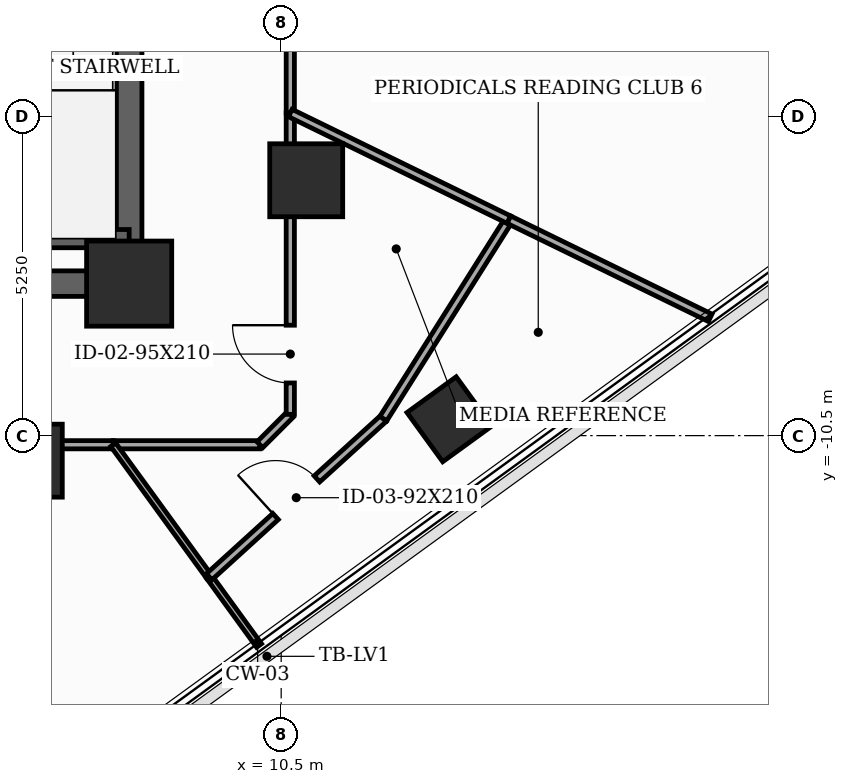
"""IFC4 building model, lengths in metres.
Left out: names, types, materials, properties, quantities, classifications, styles, units other than length and angle.
Written with IfcOpenShell. Run it as: python <this file> out.ifc"""

import sys

from ifc_helpers import new_model, si_unit, direction, frame, frame_2d, origin, origin_2d, place, context, subcontext, project, spatial, rectangle, extrude, element, fill, save


model = new_model("IFC4")
c1 = context("Model", 3, precision=1e-05, world=origin(), true_north=direction((0.0, 1.0)))
c2 = subcontext(c1, "Body", "Model", "MODEL_VIEW")
j1 = project(units=[si_unit("LENGTHUNIT", "METRE"), si_unit("PLANEANGLEUNIT", "RADIAN")], contexts=[c1])
p1 = place(None, origin())
s1 = spatial("IfcSite", under=j1, at=p1, CompositionType="ELEMENT")
p2 = place(p1, origin())
s2 = spatial("IfcBuilding", under=s1, at=p2, CompositionType="ELEMENT")
p3 = place(p2, frame((0.0, 0.0, 173.1)))
s3 = spatial("IfcBuildingStorey", under=s2, at=p3, CompositionType="ELEMENT", Elevation=173.1)
p4 = place(p3, frame((8.0, -8.0, 0.0), z_axis=(0.0, 0.0, 1.0), x_axis=(1.0, 0.0, 0.0)))
e1 = element("IfcColumn", 1, at=p4, inside=s3, PredefinedType="COLUMN", context=c2, shape_type="SweptSolid", body=[
    extrude(rectangle(XDim=1.4, YDim=1.4, at=origin_2d()), origin(), (0.0, 0.0, 1.0), 3.7),
])
for number, where, z_axis, x_axis in (
    (2, (6.3, -10.912, 0.0), (0.0, 0.0, 1.0), (1.0, 0.0, 0.0)),
    (3, (10.912, -6.3, 0.0), (0.0, 0.0, 1.0), (1.0, 0.0, 0.0)),
):
    element("IfcColumn", number, at=place(p3, frame(where, z_axis=z_axis, x_axis=x_axis)), inside=s3, PredefinedType="COLUMN", context=c2, shape_type="SweptSolid", body=[
        extrude(rectangle(XDim=1.2, YDim=1.2, at=origin_2d()), origin(), (0.0, 0.0, 1.0), 3.7),
    ])
p5 = place(p3, frame((13.268, -10.231, 0.0), z_axis=(0.0, 0.0, 1.0), x_axis=(0.809016994375, 0.587785252292, 0.0)))
e4 = element("IfcColumn", 4, at=p5, inside=s3, PredefinedType="COLUMN", context=c2, shape_type="SweptSolid", body=[
    extrude(rectangle(XDim=1.0, YDim=1.0, at=origin_2d()), origin(), (0.0, 0.0, 1.0), 3.7),
])
p6 = place(p3, frame((8.0, -8.0, 0.0), z_axis=(0.0, 0.0, 1.0), x_axis=(0.0, 1.0, 0.0)))
e5 = element("IfcWall", 5, at=p6, inside=s3, PredefinedType="SHEAR", context=c2, shape_type="SweptSolid", body=[
    extrude(rectangle(XDim=16.0, YDim=0.42, at=frame_2d((8.0, 0.0))), origin(), (0.0, 0.0, 1.0), 3.5),
])
p7 = place(p6, frame((9.6, 0.0, 0.0)))
e6 = element("IfcOpeningElement", 6, at=p7, cuts=e5, PredefinedType="OPENING", context=c2, shape_type="SweptSolid", body=[
    extrude(rectangle(XDim=1.05, YDim=2.15, at=frame_2d((0.525, 1.075))), frame((0.0, 0.22, 0.0), z_axis=(0.0, -1.0, 0.0), x_axis=(1.0, 0.0, 0.0)), (0.0, 0.0, 1.0), 0.44),
])
p8 = place(p6, frame((14.229, 0.0, 0.0)))
e7 = element("IfcOpeningElement", 7, at=p8, cuts=e5, PredefinedType="OPENING", context=c2, shape_type="SweptSolid", body=[
    extrude(rectangle(XDim=0.85, YDim=2.02, at=frame_2d((0.425, 1.01))), frame((0.0, 0.22, 0.0), z_axis=(0.0, -1.0, 0.0), x_axis=(1.0, 0.0, 0.0)), (0.0, 0.0, 1.0), 0.44),
])
p9 = place(p3, frame((-8.0, -8.0, 0.0), z_axis=(0.0, 0.0, 1.0), x_axis=(1.0, 0.0, 0.0)))
e8 = element("IfcWall", 8, at=p9, inside=s3, PredefinedType="SHEAR", context=c2, shape_type="SweptSolid", body=[
    extrude(rectangle(XDim=16.0, YDim=0.42, at=frame_2d((8.0, 0.0))), origin(), (0.0, 0.0, 1.0), 3.5),
])
p10 = place(p9, frame((4.6, 0.0, 0.0)))
e9 = element("IfcOpeningElement", 9, at=p10, cuts=e8, PredefinedType="OPENING", context=c2, shape_type="SweptSolid", body=[
    extrude(rectangle(XDim=0.95, YDim=2.1, at=frame_2d((0.475, 1.05))), frame((0.0, 0.22, 0.0), z_axis=(0.0, -1.0, 0.0), x_axis=(1.0, 0.0, 0.0)), (0.0, 0.0, 1.0), 0.44),
])
p11 = place(p9, frame((7.52, 0.0, 0.0)))
e10 = element("IfcOpeningElement", 10, at=p11, cuts=e8, PredefinedType="OPENING", context=c2, shape_type="SweptSolid", body=[
    extrude(rectangle(XDim=0.95, YDim=2.1, at=frame_2d((0.475, 1.05))), frame((0.0, 0.22, 0.0), z_axis=(0.0, -1.0, 0.0), x_axis=(1.0, 0.0, 0.0)), (0.0, 0.0, 1.0), 0.44),
])
p12 = place(p9, frame((10.45, 0.0, 0.0)))
e11 = element("IfcOpeningElement", 11, at=p12, cuts=e8, PredefinedType="OPENING", context=c2, shape_type="SweptSolid", body=[
    extrude(rectangle(XDim=0.95, YDim=2.1, at=frame_2d((0.475, 1.05))), frame((0.0, 0.22, 0.0), z_axis=(0.0, -1.0, 0.0), x_axis=(1.0, 0.0, 0.0)), (0.0, 0.0, 1.0), 0.44),
])
p13 = place(p3, frame((4.45, -7.26, 0.0), z_axis=(0.0, 0.0, 1.0), x_axis=(1.0, 0.0, 0.0)))
e12 = element("IfcWall", 12, at=p13, inside=s3, PredefinedType="SHEAR", context=c2, shape_type="SweptSolid", body=[
    extrude(rectangle(XDim=3.55, YDim=0.3, at=frame_2d((1.775, 0.0))), origin(), (0.0, 0.0, 1.0), 3.5),
])
p14 = place(p3, frame((-3.054, -10.65, 0.0), z_axis=(0.0, 0.0, 1.0), x_axis=(1.0, 0.0, 0.0)))
e13 = element("IfcWall", 13, at=p14, inside=s3, PredefinedType="PARTITIONING", context=c2, shape_type="SweptSolid", body=[
    extrude(rectangle(XDim=10.792, YDim=0.135, at=frame_2d((5.396, 0.0))), origin(), (0.0, 0.0, 1.0), 2.885),
])
p15 = place(p14, frame((4.596, 0.0, 0.0)))
e14 = element("IfcOpeningElement", 14, at=p15, cuts=e13, PredefinedType="OPENING", context=c2, shape_type="SweptSolid", body=[
    extrude(rectangle(XDim=1.6, YDim=2.15, at=frame_2d((0.8, 1.075))), frame((0.0, 0.077, 0.0), z_axis=(0.0, -1.0, 0.0), x_axis=(1.0, 0.0, 0.0)), (0.0, 0.0, 1.0), 0.155),
])
p16 = place(p3, frame((7.738, -10.65, 0.0), z_axis=(0.0, 0.0, 1.0), x_axis=(1.0, 0.0, 0.0)))
e15 = element("IfcWall", 15, at=p16, inside=s3, PredefinedType="PARTITIONING", context=c2, shape_type="SweptSolid", body=[
    extrude(rectangle(XDim=2.412, YDim=0.135, at=frame_2d((1.206, 0.0))), origin(), (0.0, 0.0, 1.0), 3.5),
])
p17 = place(p3, frame((10.15, -10.65, 0.0), z_axis=(0.0, 0.0, 1.0), x_axis=(0.707106781187, 0.707106781187, 0.0)))
e16 = element("IfcWall", 16, at=p17, inside=s3, PredefinedType="PARTITIONING", context=c2, shape_type="SweptSolid", body=[
    extrude(rectangle(XDim=0.707, YDim=0.135, at=frame_2d((0.354, 0.0))), origin(), (0.0, 0.0, 1.0), 3.5),
])
p18 = place(p3, frame((10.65, -10.15, 0.0), z_axis=(0.0, 0.0, 1.0), x_axis=(0.0, 1.0, 0.0)))
e17 = element("IfcWall", 17, at=p18, inside=s3, PredefinedType="PARTITIONING", context=c2, shape_type="SweptSolid", body=[
    extrude(rectangle(XDim=4.956, YDim=0.135, at=frame_2d((2.478, 0.0))), origin(), (0.0, 0.0, 1.0), 2.885),
])
p19 = place(p18, frame((0.516, 0.0, 0.0)))
e18 = element("IfcOpeningElement", 18, at=p19, cuts=e17, PredefinedType="OPENING", context=c2, shape_type="SweptSolid", body=[
    extrude(rectangle(XDim=0.95, YDim=2.1, at=frame_2d((0.475, 1.05))), frame((0.0, 0.077, 0.0), z_axis=(0.0, -1.0, 0.0), x_axis=(1.0, 0.0, 0.0)), (0.0, 0.0, 1.0), 0.155),
])
p20 = place(p3, frame((10.65, -5.194, 0.0), z_axis=(0.0, 0.0, 1.0), x_axis=(0.0, 1.0, 0.0)))
e19 = element("IfcWall", 19, at=p20, inside=s3, PredefinedType="PARTITIONING", context=c2, shape_type="SweptSolid", body=[
    extrude(rectangle(XDim=7.458, YDim=0.135, at=frame_2d((3.729, 0.0))), origin(), (0.0, 0.0, 1.0), 2.885),
])
p21 = place(p20, frame((3.254, 0.0, 0.0)))
e20 = element("IfcOpeningElement", 20, at=p21, cuts=e19, PredefinedType="OPENING", context=c2, shape_type="SweptSolid", body=[
    extrude(rectangle(XDim=0.95, YDim=2.1, at=frame_2d((0.475, 1.05))), frame((0.0, 0.077, 0.0), z_axis=(0.0, -1.0, 0.0), x_axis=(1.0, 0.0, 0.0)), (0.0, 0.0, 1.0), 0.155),
])
p22 = place(p3, frame((9.316, -12.822, 0.0), z_axis=(0.0, 0.0, 1.0), x_axis=(-0.587722823028, 0.80906234821, 0.0)))
e21 = element("IfcWall", 21, at=p22, inside=s3, PredefinedType="MOVABLE", context=c2, shape_type="SweptSolid", body=[
    extrude(rectangle(XDim=2.685, YDim=0.1, at=frame_2d((1.342, 0.0))), origin(), (0.0, 0.0, 1.0), 3.5),
])
p23 = place(p3, frame((10.136, -13.952, 0.0), z_axis=(0.0, 0.0, 1.0), x_axis=(-0.587422991792, 0.809280068156, 0.0)))
e22 = element("IfcWall", 22, at=p23, inside=s3, PredefinedType="MOVABLE", context=c2, shape_type="SweptSolid", body=[
    extrude(rectangle(XDim=1.396, YDim=0.1, at=frame_2d((0.698, 0.0))), origin(), (0.0, 0.0, 1.0), 2.985),
])
p24 = place(p3, frame((9.316, -12.822, 0.0), z_axis=(0.0, 0.0, 1.0), x_axis=(0.740145591151, 0.672446655058, 0.0)))
e23 = element("IfcWall", 23, at=p24, inside=s3, PredefinedType="PARTITIONING", context=c2, shape_type="SweptSolid", body=[
    extrude(rectangle(XDim=3.87, YDim=0.135, at=frame_2d((1.935, 0.0))), origin(), (0.0, 0.0, 1.0), 2.985),
])
p25 = place(p24, frame((1.475, 0.0, 0.0)))
e24 = element("IfcOpeningElement", 24, at=p25, cuts=e23, PredefinedType="OPENING", context=c2, shape_type="SweptSolid", body=[
    extrude(rectangle(XDim=0.92, YDim=2.1, at=frame_2d((0.46, 1.05))), frame((0.0, 0.077, 0.0), z_axis=(0.0, -1.0, 0.0), x_axis=(1.0, 0.0, 0.0)), (0.0, 0.0, 1.0), 0.155),
])
p26 = place(p3, frame((12.18, -10.22, 0.0), z_axis=(0.0, 0.0, 1.0), x_axis=(0.533748447558, 0.845643302302, 0.0)))
e25 = element("IfcWall", 25, at=p26, inside=s3, PredefinedType="PARTITIONING", context=c2, shape_type="SweptSolid", body=[
    extrude(rectangle(XDim=3.869, YDim=0.135, at=frame_2d((1.935, 0.0))), origin(), (0.0, 0.0, 1.0), 2.885),
])
p27 = place(p3, frame((14.245, -6.948, 0.0), z_axis=(0.0, 0.0, 1.0), x_axis=(-0.898754367686, 0.43845249066, 0.0)))
e26 = element("IfcWall", 26, at=p27, inside=s3, PredefinedType="PARTITIONING", context=c2, shape_type="SweptSolid", body=[
    extrude(rectangle(XDim=4.0, YDim=0.135, at=frame_2d((2.0, 0.0))), origin(), (0.0, 0.0, 1.0), 2.885),
])
p28 = place(p3, frame((17.555, -8.562, 0.0), z_axis=(0.0, 0.0, 1.0), x_axis=(-0.898837884032, 0.438281254708, 0.0)))
e27 = element("IfcWall", 27, at=p28, inside=s3, PredefinedType="PARTITIONING", context=c2, shape_type="SweptSolid", body=[
    extrude(rectangle(XDim=3.683, YDim=0.135, at=frame_2d((1.841, 0.0))), origin(), (0.0, 0.0, 1.0), 2.985),
])
p29 = place(p19, origin())
e28 = element("IfcDoor", 28, at=p29, inside=s3, OperationType="SINGLE_SWING_RIGHT", PredefinedType="DOOR", context=c2, shape_type="SweptSolid", body=[
    extrude(rectangle(XDim=0.95, YDim=2.1, at=frame_2d((0.475, 1.05))), frame((0.0, 0.025, 0.0), z_axis=(0.0, -1.0, 0.0), x_axis=(1.0, 0.0, 0.0)), (0.0, 0.0, 1.0), 0.05),
])
fill(e18, e28)
p30 = place(p25, origin())
e29 = element("IfcDoor", 29, at=p30, inside=s3, OperationType="SINGLE_SWING_LEFT", PredefinedType="DOOR", context=c2, shape_type="SweptSolid", body=[
    extrude(rectangle(XDim=0.92, YDim=2.1, at=frame_2d((0.46, 1.05))), frame((0.0, 0.025, 0.0), z_axis=(0.0, -1.0, 0.0), x_axis=(1.0, 0.0, 0.0)), (0.0, 0.0, 1.0), 0.05),
])
fill(e24, e29)
save(model, sys.argv[1])
